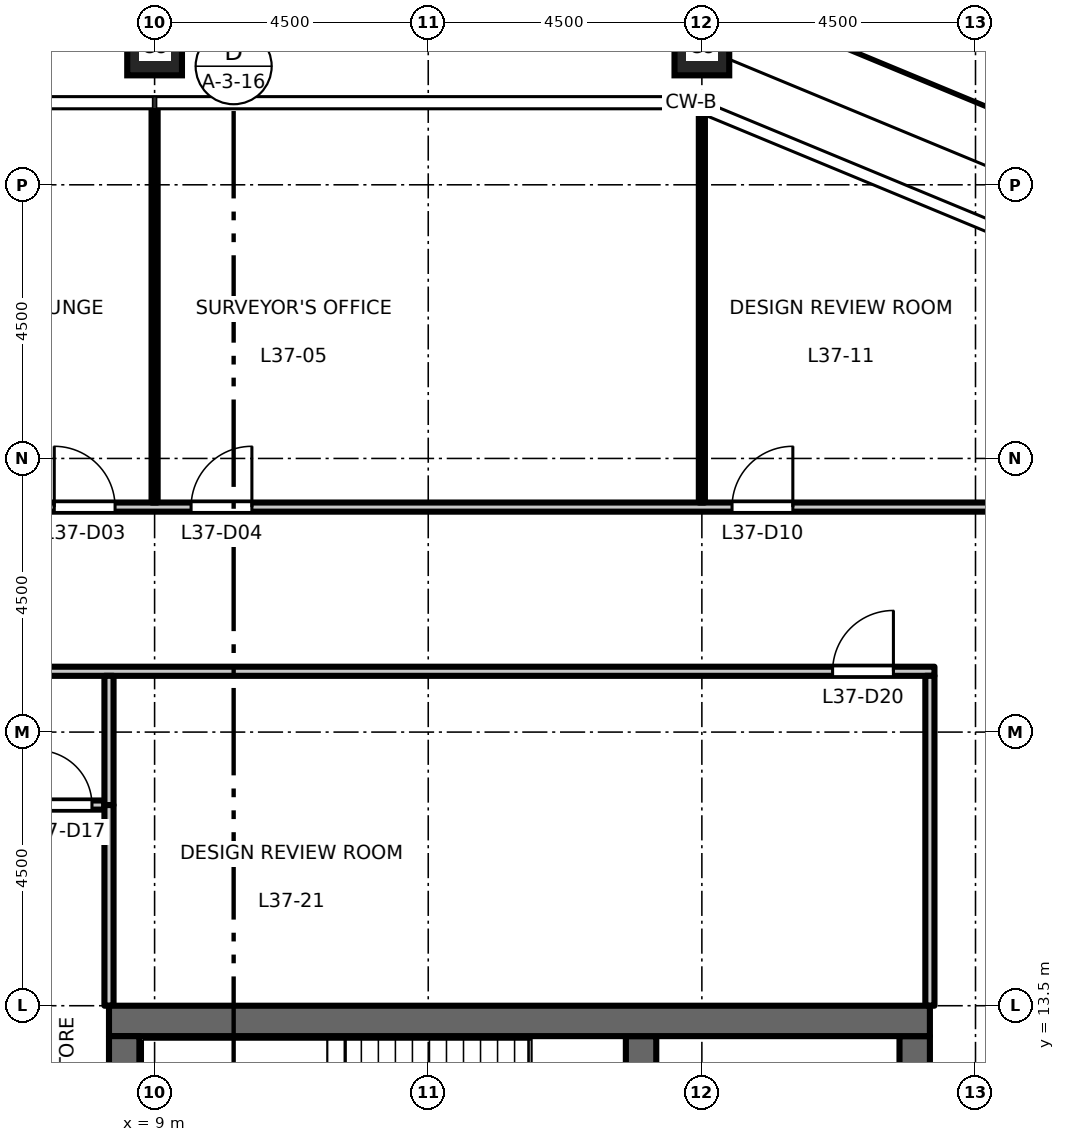
"""IFC4 building model, lengths in metres.
Left out: names, types, materials, properties, quantities, classifications, styles, units other than length and angle.
Written with IfcOpenShell. Run it as: python <this file> out.ifc"""

import sys

from ifc_helpers import new_model, si_unit, direction, frame, frame_2d, origin, origin_2d, place, context, subcontext, project, spatial, rectangle, hollow_rectangle, extrude, element, fill, save


model = new_model("IFC4")
c1 = context("Model", 3, precision=1e-05, world=origin(), true_north=direction((0.0, 1.0)))
c2 = subcontext(c1, "Body", "Model", "MODEL_VIEW")
j1 = project(units=[si_unit("LENGTHUNIT", "METRE"), si_unit("PLANEANGLEUNIT", "RADIAN")], contexts=[c1])
p1 = place(None, origin())
s1 = spatial("IfcSite", under=j1, at=p1, CompositionType="ELEMENT")
p2 = place(p1, origin())
s2 = spatial("IfcBuilding", under=s1, at=p2, CompositionType="ELEMENT")
p3 = place(p2, frame((0.0, 0.0, 172.2)))
s3 = spatial("IfcBuildingStorey", under=s2, at=p3, CompositionType="ELEMENT", Elevation=172.2)
for number, where, z_axis, x_axis in (
    (1, (18.0, 29.25, 0.0), (0.0, 0.0, 1.0), (1.0, 0.0, 0.0)),
    (2, (9.0, 29.25, 0.0), (0.0, 0.0, 1.0), (1.0, 0.0, 0.0)),
):
    element("IfcColumn", number, at=place(p3, frame(where, z_axis=z_axis, x_axis=x_axis)), inside=s3, PredefinedType="COLUMN", context=c2, shape_type="SweptSolid", body=[
        extrude(hollow_rectangle(XDim=0.9, YDim=0.9, WallThickness=0.05, at=origin_2d()), origin(), (0.0, 0.0, 1.0), 4.5),
    ])
p4 = place(p3, frame((21.5, -13.0, 0.0), z_axis=(0.0, 0.0, 1.0), x_axis=(0.0, 1.0, 0.0)))
e3 = element("IfcWall", 3, at=p4, inside=s3, PredefinedType="SHEAR", context=c2, shape_type="SweptSolid", body=[
    extrude(rectangle(XDim=26.0, YDim=0.5, at=frame_2d((13.0, 0.0))), origin(), (0.0, 0.0, 1.0), 4.35),
])
p5 = place(p4, frame((16.825, 0.0, 0.0)))
e4 = element("IfcOpeningElement", 4, at=p5, cuts=e3, PredefinedType="OPENING", context=c2, shape_type="SweptSolid", body=[
    extrude(rectangle(XDim=1.8, YDim=2.1, at=frame_2d((0.9, 1.05))), frame((0.0, 0.26, 0.0), z_axis=(0.0, -1.0, 0.0), x_axis=(1.0, 0.0, 0.0)), (0.0, 0.0, 1.0), 0.52),
])
p6 = place(p4, frame((7.375, 0.0, 0.0)))
e5 = element("IfcOpeningElement", 5, at=p6, cuts=e3, PredefinedType="OPENING", context=c2, shape_type="SweptSolid", body=[
    extrude(rectangle(XDim=1.8, YDim=2.1, at=frame_2d((0.9, 1.05))), frame((0.0, 0.26, 0.0), z_axis=(0.0, -1.0, 0.0), x_axis=(1.0, 0.0, 0.0)), (0.0, 0.0, 1.0), 0.52),
])
p7 = place(p4, frame((22.45, 0.0, 0.0)))
e6 = element("IfcOpeningElement", 6, at=p7, cuts=e3, PredefinedType="OPENING", context=c2, shape_type="SweptSolid", body=[
    extrude(rectangle(XDim=0.9, YDim=2.1, at=frame_2d((0.45, 1.05))), frame((0.0, 0.26, 0.0), z_axis=(0.0, -1.0, 0.0), x_axis=(1.0, 0.0, 0.0)), (0.0, 0.0, 1.0), 0.52),
])
p8 = place(p4, frame((1.7, 0.0, 0.0)))
e7 = element("IfcOpeningElement", 7, at=p8, cuts=e3, PredefinedType="OPENING", context=c2, shape_type="SweptSolid", body=[
    extrude(rectangle(XDim=0.9, YDim=2.1, at=frame_2d((0.45, 1.05))), frame((0.0, 0.26, 0.0), z_axis=(0.0, -1.0, 0.0), x_axis=(1.0, 0.0, 0.0)), (0.0, 0.0, 1.0), 0.52),
])
p9 = place(p3, frame((17.0, 6.425, 0.0), z_axis=(0.0, 0.0, 1.0), x_axis=(0.0, 1.0, 0.0)))
e8 = element("IfcWall", 8, at=p9, inside=s3, PredefinedType="SHEAR", context=c2, shape_type="SweptSolid", body=[
    extrude(rectangle(XDim=6.575, YDim=0.5, at=frame_2d((3.288, 0.0))), origin(), (0.0, 0.0, 1.0), 4.35),
])
p10 = place(p3, frame((8.25, 13.25, 0.0), z_axis=(0.0, 0.0, 1.0), x_axis=(1.0, 0.0, 0.0)))
e9 = element("IfcWall", 9, at=p10, inside=s3, PredefinedType="SHEAR", context=c2, shape_type="SweptSolid", body=[
    extrude(rectangle(XDim=13.5, YDim=0.5, at=frame_2d((6.75, 0.0))), origin(), (0.0, 0.0, 1.0), 4.35),
])
p11 = place(p3, frame((8.5, -13.0, 0.0), z_axis=(0.0, 0.0, 1.0), x_axis=(0.0, 1.0, 0.0)))
e10 = element("IfcWall", 10, at=p11, inside=s3, PredefinedType="SHEAR", context=c2, shape_type="SweptSolid", body=[
    extrude(rectangle(XDim=26.0, YDim=0.5, at=frame_2d((13.0, 0.0))), origin(), (0.0, 0.0, 1.0), 4.35),
])
p12 = place(p3, frame((6.92, 16.8, 0.0), z_axis=(0.0, 0.0, 1.0), x_axis=(1.0, 0.0, 0.0)))
e11 = element("IfcWall", 11, at=p12, inside=s3, PredefinedType="PARTITIONING", context=c2, shape_type="SweptSolid", body=[
    extrude(rectangle(XDim=1.255, YDim=0.15, at=frame_2d((0.627, 0.0))), origin(), (0.0, 0.0, 1.0), 4.35),
])
p13 = place(p12, frame((0.15, 0.0, 0.0)))
e12 = element("IfcOpeningElement", 12, at=p13, cuts=e11, PredefinedType="OPENING", context=c2, shape_type="SweptSolid", body=[
    extrude(rectangle(XDim=0.9, YDim=2.1, at=frame_2d((0.45, 1.05))), frame((0.0, 0.085, 0.0), z_axis=(0.0, -1.0, 0.0), x_axis=(1.0, 0.0, 0.0)), (0.0, 0.0, 1.0), 0.17),
])
p14 = place(p3, frame((-21.825, 19.0, 0.0), z_axis=(0.0, 0.0, 1.0), x_axis=(1.0, 0.0, 0.0)))
e13 = element("IfcWall", 13, at=p14, inside=s3, PredefinedType="PARTITIONING", context=c2, shape_type="SweptSolid", body=[
    extrude(rectangle(XDim=43.65, YDim=0.15, at=frame_2d((21.825, 0.0))), origin(), (0.0, 0.0, 1.0), 4.35),
])
p15 = place(p14, frame((14.225, 0.0, 0.0)))
e14 = element("IfcOpeningElement", 14, at=p15, cuts=e13, PredefinedType="OPENING", context=c2, shape_type="SweptSolid", body=[
    extrude(rectangle(XDim=1.0, YDim=2.1, at=frame_2d((0.5, 1.05))), frame((0.0, 0.085, 0.0), z_axis=(0.0, -1.0, 0.0), x_axis=(1.0, 0.0, 0.0)), (0.0, 0.0, 1.0), 0.17),
])
p16 = place(p14, frame((0.725, 0.0, 0.0)))
e15 = element("IfcOpeningElement", 15, at=p16, cuts=e13, PredefinedType="OPENING", context=c2, shape_type="SweptSolid", body=[
    extrude(rectangle(XDim=1.0, YDim=2.1, at=frame_2d((0.5, 1.05))), frame((0.0, 0.085, 0.0), z_axis=(0.0, -1.0, 0.0), x_axis=(1.0, 0.0, 0.0)), (0.0, 0.0, 1.0), 0.17),
])
p17 = place(p14, frame((41.975, 0.0, 0.0)))
e16 = element("IfcOpeningElement", 16, at=p17, cuts=e13, PredefinedType="OPENING", context=c2, shape_type="SweptSolid", body=[
    extrude(rectangle(XDim=1.0, YDim=2.1, at=frame_2d((0.5, 1.05))), frame((0.0, 0.085, 0.0), z_axis=(0.0, -1.0, 0.0), x_axis=(1.0, 0.0, 0.0)), (0.0, 0.0, 1.0), 0.17),
])
p18 = place(p3, frame((-26.646, 21.7, 0.0), z_axis=(0.0, 0.0, 1.0), x_axis=(1.0, 0.0, 0.0)))
e17 = element("IfcWall", 17, at=p18, inside=s3, PredefinedType="PARTITIONING", context=c2, shape_type="SweptSolid", body=[
    extrude(rectangle(XDim=53.292, YDim=0.15, at=frame_2d((26.646, 0.0))), origin(), (0.0, 0.0, 1.0), 4.35),
])
p19 = place(p18, frame((15.996, 0.0, 0.0)))
e18 = element("IfcOpeningElement", 18, at=p19, cuts=e17, PredefinedType="OPENING", context=c2, shape_type="SweptSolid", body=[
    extrude(rectangle(XDim=1.0, YDim=2.1, at=frame_2d((0.5, 1.05))), frame((0.0, 0.085, 0.0), z_axis=(0.0, -1.0, 0.0), x_axis=(1.0, 0.0, 0.0)), (0.0, 0.0, 1.0), 0.17),
])
p20 = place(p18, frame((18.246, 0.0, 0.0)))
e19 = element("IfcOpeningElement", 19, at=p20, cuts=e17, PredefinedType="OPENING", context=c2, shape_type="SweptSolid", body=[
    extrude(rectangle(XDim=1.0, YDim=2.1, at=frame_2d((0.5, 1.05))), frame((0.0, 0.085, 0.0), z_axis=(0.0, -1.0, 0.0), x_axis=(1.0, 0.0, 0.0)), (0.0, 0.0, 1.0), 0.17),
])
p21 = place(p18, frame((33.996, 0.0, 0.0)))
e20 = element("IfcOpeningElement", 20, at=p21, cuts=e17, PredefinedType="OPENING", context=c2, shape_type="SweptSolid", body=[
    extrude(rectangle(XDim=1.0, YDim=2.1, at=frame_2d((0.5, 1.05))), frame((0.0, 0.085, 0.0), z_axis=(0.0, -1.0, 0.0), x_axis=(1.0, 0.0, 0.0)), (0.0, 0.0, 1.0), 0.17),
])
p22 = place(p18, frame((36.246, 0.0, 0.0)))
e21 = element("IfcOpeningElement", 21, at=p22, cuts=e17, PredefinedType="OPENING", context=c2, shape_type="SweptSolid", body=[
    extrude(rectangle(XDim=1.0, YDim=2.1, at=frame_2d((0.5, 1.05))), frame((0.0, 0.085, 0.0), z_axis=(0.0, -1.0, 0.0), x_axis=(1.0, 0.0, 0.0)), (0.0, 0.0, 1.0), 0.17),
])
p23 = place(p18, frame((6.996, 0.0, 0.0)))
e22 = element("IfcOpeningElement", 22, at=p23, cuts=e17, PredefinedType="OPENING", context=c2, shape_type="SweptSolid", body=[
    extrude(rectangle(XDim=1.0, YDim=2.1, at=frame_2d((0.5, 1.05))), frame((0.0, 0.085, 0.0), z_axis=(0.0, -1.0, 0.0), x_axis=(1.0, 0.0, 0.0)), (0.0, 0.0, 1.0), 0.17),
])
p24 = place(p18, frame((45.142, 0.0, 0.0)))
e23 = element("IfcOpeningElement", 23, at=p24, cuts=e17, PredefinedType="OPENING", context=c2, shape_type="SweptSolid", body=[
    extrude(rectangle(XDim=1.0, YDim=2.1, at=frame_2d((0.5, 1.05))), frame((0.0, 0.085, 0.0), z_axis=(0.0, -1.0, 0.0), x_axis=(1.0, 0.0, 0.0)), (0.0, 0.0, 1.0), 0.17),
])
p25 = place(p3, frame((8.25, 16.8, 0.0), z_axis=(0.0, 0.0, 1.0), x_axis=(0.0, 1.0, 0.0)))
e24 = element("IfcWall", 24, at=p25, inside=s3, PredefinedType="PARTITIONING", context=c2, shape_type="SweptSolid", body=[
    extrude(rectangle(XDim=2.125, YDim=0.15, at=frame_2d((1.062, 0.0))), origin(), (0.0, 0.0, 1.0), 4.35),
])
p26 = place(p3, frame((8.25, 13.5, 0.0), z_axis=(0.0, 0.0, 1.0), x_axis=(0.0, 1.0, 0.0)))
e25 = element("IfcWall", 25, at=p26, inside=s3, PredefinedType="PARTITIONING", context=c2, shape_type="SweptSolid", body=[
    extrude(rectangle(XDim=3.3, YDim=0.15, at=frame_2d((1.65, 0.0))), origin(), (0.0, 0.0, 1.0), 4.35),
])
p27 = place(p3, frame((9.0, 21.775, 0.0), z_axis=(0.0, 0.0, 1.0), x_axis=(0.0, 1.0, 0.0)))
e26 = element("IfcWall", 26, at=p27, inside=s3, PredefinedType="PARTITIONING", context=c2, shape_type="SweptSolid", body=[
    extrude(rectangle(XDim=6.485, YDim=0.1, at=frame_2d((3.243, 0.0))), origin(), (0.0, 0.0, 1.0), 3.45),
])
p28 = place(p3, frame((18.0, 21.775, 0.0), z_axis=(0.0, 0.0, 1.0), x_axis=(0.0, 1.0, 0.0)))
e27 = element("IfcWall", 27, at=p28, inside=s3, PredefinedType="PARTITIONING", context=c2, shape_type="SweptSolid", body=[
    extrude(rectangle(XDim=6.403, YDim=0.1, at=frame_2d((3.202, 0.0))), origin(), (0.0, 0.0, 1.0), 3.45),
])
p29 = place(p3, frame((21.75, 13.5, 0.0), z_axis=(0.0, 0.0, 1.0), x_axis=(0.0, 1.0, 0.0)))
e28 = element("IfcWall", 28, at=p29, inside=s3, PredefinedType="PARTITIONING", context=c2, shape_type="SweptSolid", body=[
    extrude(rectangle(XDim=5.425, YDim=0.15, at=frame_2d((2.712, 0.0))), origin(), (0.0, 0.0, 1.0), 4.35),
])
p30 = place(p21, origin())
e29 = element("IfcDoor", 29, at=p30, inside=s3, OperationType="SINGLE_SWING_LEFT", PredefinedType="DOOR", context=c2, shape_type="SweptSolid", body=[
    extrude(rectangle(XDim=1.0, YDim=2.1, at=frame_2d((0.5, 1.05))), frame((0.0, 0.025, 0.0), z_axis=(0.0, -1.0, 0.0), x_axis=(1.0, 0.0, 0.0)), (0.0, 0.0, 1.0), 0.05),
])
fill(e20, e29)
p31 = place(p22, origin())
e30 = element("IfcDoor", 30, at=p31, inside=s3, OperationType="SINGLE_SWING_RIGHT", PredefinedType="DOOR", context=c2, shape_type="SweptSolid", body=[
    extrude(rectangle(XDim=1.0, YDim=2.1, at=frame_2d((0.5, 1.05))), frame((0.0, 0.025, 0.0), z_axis=(0.0, -1.0, 0.0), x_axis=(1.0, 0.0, 0.0)), (0.0, 0.0, 1.0), 0.05),
])
fill(e21, e30)
p32 = place(p24, origin())
e31 = element("IfcDoor", 31, at=p32, inside=s3, OperationType="SINGLE_SWING_RIGHT", PredefinedType="DOOR", context=c2, shape_type="SweptSolid", body=[
    extrude(rectangle(XDim=1.0, YDim=2.1, at=frame_2d((0.5, 1.05))), frame((0.0, 0.025, 0.0), z_axis=(0.0, -1.0, 0.0), x_axis=(1.0, 0.0, 0.0)), (0.0, 0.0, 1.0), 0.05),
])
fill(e23, e31)
p33 = place(p13, origin())
e32 = element("IfcDoor", 32, at=p33, inside=s3, OperationType="SINGLE_SWING_LEFT", PredefinedType="DOOR", context=c2, shape_type="SweptSolid", body=[
    extrude(rectangle(XDim=0.9, YDim=2.1, at=frame_2d((0.45, 1.05))), frame((0.0, 0.025, 0.0), z_axis=(0.0, -1.0, 0.0), x_axis=(1.0, 0.0, 0.0)), (0.0, 0.0, 1.0), 0.05),
])
fill(e12, e32)
p34 = place(p17, origin())
e33 = element("IfcDoor", 33, at=p34, inside=s3, OperationType="SINGLE_SWING_RIGHT", PredefinedType="DOOR", context=c2, shape_type="SweptSolid", body=[
    extrude(rectangle(XDim=1.0, YDim=2.1, at=frame_2d((0.5, 1.05))), frame((0.0, 0.025, 0.0), z_axis=(0.0, -1.0, 0.0), x_axis=(1.0, 0.0, 0.0)), (0.0, 0.0, 1.0), 0.05),
])
fill(e16, e33)
save(model, sys.argv[1])
